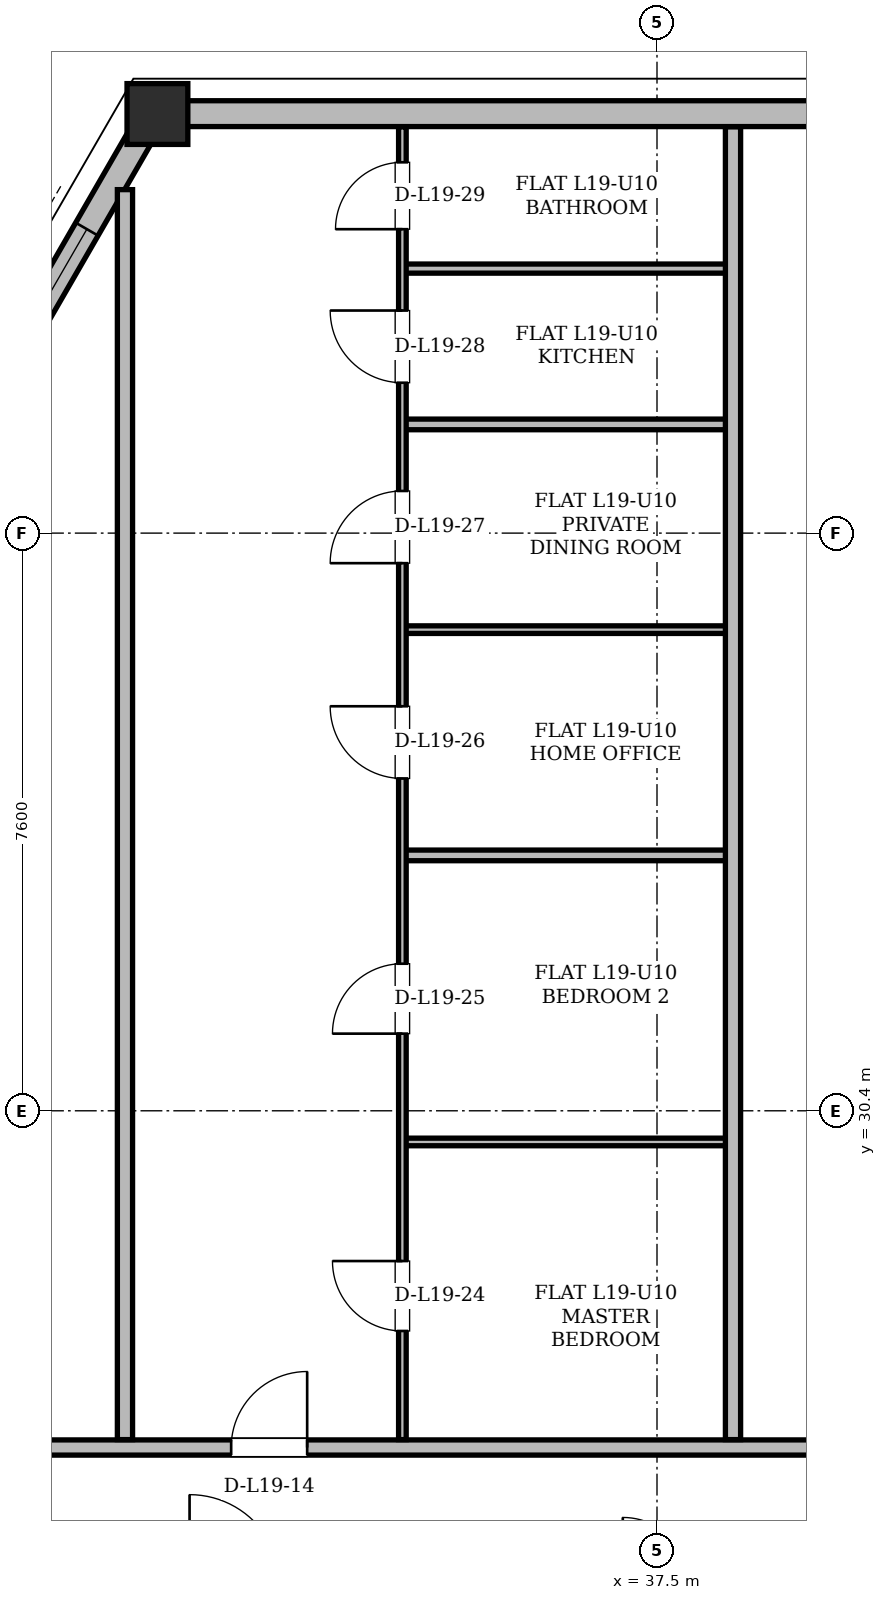
"""IFC4 building model, lengths in metres.
Left out: names, types, materials, properties, quantities, classifications, styles, units other than length and angle.
Written with IfcOpenShell. Run it as: python <this file> out.ifc"""

import sys

from ifc_helpers import new_model, si_unit, direction, frame, frame_2d, origin, origin_2d, place, context, subcontext, project, spatial, rectangle, hollow_rectangle, extrude, element, fill, save


model = new_model("IFC4")
c1 = context("Model", 3, precision=1e-05, world=origin(), true_north=direction((0.0, 1.0)))
c2 = subcontext(c1, "Body", "Model", "MODEL_VIEW")
j1 = project(units=[si_unit("LENGTHUNIT", "METRE"), si_unit("PLANEANGLEUNIT", "RADIAN")], contexts=[c1])
p1 = place(None, origin())
s1 = spatial("IfcSite", under=j1, at=p1, CompositionType="ELEMENT")
p2 = place(p1, origin())
s2 = spatial("IfcBuilding", under=s1, at=p2, CompositionType="ELEMENT")
p3 = place(p2, frame((0.0, 0.0, 74.1)))
s3 = spatial("IfcBuildingStorey", under=s2, at=p3, CompositionType="ELEMENT", Elevation=74.1)
p4 = place(p3, frame((30.876, 43.518, 0.004), z_axis=(0.028338509418, -0.002582406134, 0.999595048038), x_axis=(0.090751072182, 0.995873607893, 0.0)))
e1 = element("IfcColumn", 1, at=p4, inside=s3, PredefinedType="COLUMN", context=c2, shape_type="SweptSolid", body=[
    extrude(hollow_rectangle(XDim=0.8, YDim=0.8, WallThickness=0.065, at=origin_2d()), origin(), (0.0, 0.0, 1.0), 3.593),
])
p5 = place(p3, frame((44.124, 43.518, 0.0), z_axis=(0.0, 0.0, 1.0), x_axis=(-1.0, 0.0, 0.0)))
e2 = element("IfcWall", 2, at=p5, inside=s3, PredefinedType="SOLIDWALL", context=c2, shape_type="SweptSolid", body=[
    extrude(rectangle(XDim=13.248, YDim=0.34, at=frame_2d((6.624, 0.0))), origin(), (0.0, 0.0, 1.0), 2.474),
])
p6 = place(p5, frame((3.311, 0.0, 0.85)))
e3 = element("IfcOpeningElement", 3, at=p6, cuts=e2, PredefinedType="OPENING", context=c2, shape_type="SweptSolid", body=[
    extrude(rectangle(XDim=1.2, YDim=1.48, at=frame_2d((0.6, 0.74))), frame((0.0, 0.17, 0.0), z_axis=(0.0, -1.0, 0.0), x_axis=(1.0, 0.0, 0.0)), (0.0, 0.0, 1.0), 0.34),
])
p7 = place(p3, frame((30.876, 43.518, 0.0), z_axis=(0.0, 0.0, 1.0), x_axis=(-0.500000596145, -0.8660250596, 0.0)))
e4 = element("IfcWall", 4, at=p7, inside=s3, PredefinedType="SOLIDWALL", context=c2, shape_type="SweptSolid", body=[
    extrude(rectangle(XDim=33.938, YDim=0.34, at=frame_2d((16.969, 0.0))), origin(), (0.0, 0.0, 1.0), 2.474),
])
p8 = place(p7, frame((7.824, 0.0, 0.0)))
e5 = element("IfcOpeningElement", 5, at=p8, cuts=e4, PredefinedType="OPENING", context=c2, shape_type="SweptSolid", body=[
    extrude(rectangle(XDim=1.5, YDim=2.2, at=frame_2d((0.75, 1.1))), frame((0.0, 0.17, 0.0), z_axis=(0.0, -1.0, 0.0), x_axis=(1.0, 0.0, 0.0)), (0.0, 0.0, 1.0), 0.34),
])
p9 = place(p7, frame((25.439, 0.0, 0.0)))
e6 = element("IfcOpeningElement", 6, at=p9, cuts=e4, PredefinedType="OPENING", context=c2, shape_type="SweptSolid", body=[
    extrude(rectangle(XDim=1.5, YDim=2.2, at=frame_2d((0.75, 1.1))), frame((0.0, 0.17, 0.0), z_axis=(0.0, -1.0, 0.0), x_axis=(1.0, 0.0, 0.0)), (0.0, 0.0, 1.0), 0.34),
])
p10 = place(p7, frame((30.161, 0.0, 0.85)))
e7 = element("IfcOpeningElement", 7, at=p10, cuts=e4, PredefinedType="OPENING", context=c2, shape_type="SweptSolid", body=[
    extrude(rectangle(XDim=2.0, YDim=1.514, at=frame_2d((1.0, 0.757))), frame((0.0, 0.17, 0.0), z_axis=(0.0, -1.0, 0.0), x_axis=(1.0, 0.0, 0.0)), (0.0, 0.0, 1.0), 0.34),
])
p11 = place(p7, frame((1.755, 0.0, 0.85)))
e8 = element("IfcOpeningElement", 8, at=p11, cuts=e4, PredefinedType="OPENING", context=c2, shape_type="SweptSolid", body=[
    extrude(rectangle(XDim=1.2, YDim=1.474, at=frame_2d((0.6, 0.737))), frame((0.0, 0.17, 0.0), z_axis=(0.0, -1.0, 0.0), x_axis=(1.0, 0.0, 0.0)), (0.0, 0.0, 1.0), 0.34),
])
p12 = place(p7, frame((11.834, 0.0, 0.85)))
e9 = element("IfcOpeningElement", 9, at=p12, cuts=e4, PredefinedType="OPENING", context=c2, shape_type="SweptSolid", body=[
    extrude(rectangle(XDim=1.2, YDim=1.474, at=frame_2d((0.6, 0.737))), frame((0.0, 0.17, 0.0), z_axis=(0.0, -1.0, 0.0), x_axis=(1.0, 0.0, 0.0)), (0.0, 0.0, 1.0), 0.34),
])
p13 = place(p7, frame((14.358, 0.0, 0.85)))
e10 = element("IfcOpeningElement", 10, at=p13, cuts=e4, PredefinedType="OPENING", context=c2, shape_type="SweptSolid", body=[
    extrude(rectangle(XDim=1.2, YDim=1.474, at=frame_2d((0.6, 0.737))), frame((0.0, 0.17, 0.0), z_axis=(0.0, -1.0, 0.0), x_axis=(1.0, 0.0, 0.0)), (0.0, 0.0, 1.0), 0.34),
])
p14 = place(p7, frame((17.071, 0.0, 0.85)))
e11 = element("IfcOpeningElement", 11, at=p14, cuts=e4, PredefinedType="OPENING", context=c2, shape_type="SweptSolid", body=[
    extrude(rectangle(XDim=1.2, YDim=1.474, at=frame_2d((0.6, 0.737))), frame((0.0, 0.17, 0.0), z_axis=(0.0, -1.0, 0.0), x_axis=(1.0, 0.0, 0.0)), (0.0, 0.0, 1.0), 0.34),
])
p15 = place(p7, frame((32.628, 0.0, 0.85)))
e12 = element("IfcOpeningElement", 12, at=p15, cuts=e4, PredefinedType="OPENING", context=c2, shape_type="SweptSolid", body=[
    extrude(rectangle(XDim=0.7, YDim=1.2, at=frame_2d((0.35, 0.6))), frame((0.0, 0.17, 0.0), z_axis=(0.0, -1.0, 0.0), x_axis=(1.0, 0.0, 0.0)), (0.0, 0.0, 1.0), 0.34),
])
p16 = place(p3, frame((27.55, 25.97, 0.0), z_axis=(0.0, 0.0, 1.0), x_axis=(1.0, 0.0, 0.0)))
e13 = element("IfcWall", 13, at=p16, inside=s3, PredefinedType="PARTITIONING", context=c2, shape_type="SweptSolid", body=[
    extrude(rectangle(XDim=19.9, YDim=0.2, at=frame_2d((9.95, 0.0))), origin(), (0.0, 0.0, 1.0), 2.718),
])
p17 = place(p16, frame((0.425, 0.0, 0.0)))
e14 = element("IfcOpeningElement", 14, at=p17, cuts=e13, PredefinedType="OPENING", context=c2, shape_type="SweptSolid", body=[
    extrude(rectangle(XDim=1.0, YDim=2.18, at=frame_2d((0.5, 1.09))), frame((0.0, 0.1, 0.0), z_axis=(0.0, -1.0, 0.0), x_axis=(1.0, 0.0, 0.0)), (0.0, 0.0, 1.0), 0.2),
])
p18 = place(p16, frame((4.347, 0.0, 0.0)))
e15 = element("IfcOpeningElement", 15, at=p18, cuts=e13, PredefinedType="OPENING", context=c2, shape_type="SweptSolid", body=[
    extrude(rectangle(XDim=1.0, YDim=2.18, at=frame_2d((0.5, 1.09))), frame((0.0, 0.1, 0.0), z_axis=(0.0, -1.0, 0.0), x_axis=(1.0, 0.0, 0.0)), (0.0, 0.0, 1.0), 0.2),
])
p19 = place(p16, frame((12.208, 0.0, 0.0)))
e16 = element("IfcOpeningElement", 16, at=p19, cuts=e13, PredefinedType="OPENING", context=c2, shape_type="SweptSolid", body=[
    extrude(rectangle(XDim=1.0, YDim=2.18, at=frame_2d((0.5, 1.09))), frame((0.0, 0.1, 0.0), z_axis=(0.0, -1.0, 0.0), x_axis=(1.0, 0.0, 0.0)), (0.0, 0.0, 1.0), 0.2),
])
p20 = place(p3, frame((34.15, 29.99, 0.0), z_axis=(0.0, 0.0, 1.0), x_axis=(1.0, 0.0, 0.0)))
e17 = element("IfcWall", 17, at=p20, inside=s3, PredefinedType="PARTITIONING", context=c2, shape_type="SweptSolid", body=[
    extrude(rectangle(XDim=4.4, YDim=0.1, at=frame_2d((2.2, 0.0))), origin(), (0.0, 0.0, 1.0), 3.34),
])
p21 = place(p3, frame((34.15, 33.76, 0.0), z_axis=(0.0, 0.0, 1.0), x_axis=(1.0, 0.0, 0.0)))
e18 = element("IfcWall", 18, at=p21, inside=s3, PredefinedType="PARTITIONING", context=c2, shape_type="SweptSolid", body=[
    extrude(rectangle(XDim=4.4, YDim=0.14, at=frame_2d((2.2, 0.0))), origin(), (0.0, 0.0, 1.0), 3.34),
])
p22 = place(p3, frame((34.15, 36.73, 0.0), z_axis=(0.0, 0.0, 1.0), x_axis=(1.0, 0.0, 0.0)))
e19 = element("IfcWall", 19, at=p22, inside=s3, PredefinedType="PARTITIONING", context=c2, shape_type="SweptSolid", body=[
    extrude(rectangle(XDim=4.4, YDim=0.1, at=frame_2d((2.2, 0.0))), origin(), (0.0, 0.0, 1.0), 3.34),
])
p23 = place(p3, frame((34.15, 39.43, 0.0), z_axis=(0.0, 0.0, 1.0), x_axis=(1.0, 0.0, 0.0)))
e20 = element("IfcWall", 20, at=p23, inside=s3, PredefinedType="PARTITIONING", context=c2, shape_type="SweptSolid", body=[
    extrude(rectangle(XDim=4.4, YDim=0.14, at=frame_2d((2.2, 0.0))), origin(), (0.0, 0.0, 1.0), 3.34),
])
p24 = place(p3, frame((34.15, 41.48, 0.0), z_axis=(0.0, 0.0, 1.0), x_axis=(1.0, 0.0, 0.0)))
e21 = element("IfcWall", 21, at=p24, inside=s3, PredefinedType="PARTITIONING", context=c2, shape_type="SweptSolid", body=[
    extrude(rectangle(XDim=4.4, YDim=0.12, at=frame_2d((2.2, 0.0))), origin(), (0.0, 0.0, 1.0), 3.34),
])
p25 = place(p3, frame((30.5, 26.074, 0.0), z_axis=(0.0, 0.0, 1.0), x_axis=(0.0, 1.0, 0.0)))
e22 = element("IfcWall", 22, at=p25, inside=s3, PredefinedType="PARTITIONING", context=c2, shape_type="SweptSolid", body=[
    extrude(rectangle(XDim=16.445, YDim=0.2, at=frame_2d((8.222, 0.0))), origin(), (0.0, 0.0, 1.0), 2.474),
])
p26 = place(p3, frame((34.15, 26.074, 0.0), z_axis=(0.0, 0.0, 1.0), x_axis=(0.0, 1.0, 0.0)))
e23 = element("IfcWall", 23, at=p26, inside=s3, PredefinedType="PARTITIONING", context=c2, shape_type="SweptSolid", body=[
    extrude(rectangle(XDim=17.271, YDim=0.1, at=frame_2d((8.635, 0.0))), origin(), (0.0, 0.0, 1.0), 3.34),
])
p27 = place(p26, frame((1.429, 0.0, 0.0)))
e24 = element("IfcOpeningElement", 24, at=p27, cuts=e23, PredefinedType="OPENING", context=c2, shape_type="SweptSolid", body=[
    extrude(rectangle(XDim=0.92, YDim=2.12, at=frame_2d((0.46, 1.06))), frame((0.0, 0.05, 0.0), z_axis=(0.0, -1.0, 0.0), x_axis=(1.0, 0.0, 0.0)), (0.0, 0.0, 1.0), 0.1),
])
p28 = place(p26, frame((5.341, 0.0, 0.0)))
e25 = element("IfcOpeningElement", 25, at=p28, cuts=e23, PredefinedType="OPENING", context=c2, shape_type="SweptSolid", body=[
    extrude(rectangle(XDim=0.92, YDim=2.12, at=frame_2d((0.46, 1.06))), frame((0.0, 0.05, 0.0), z_axis=(0.0, -1.0, 0.0), x_axis=(1.0, 0.0, 0.0)), (0.0, 0.0, 1.0), 0.1),
])
p29 = place(p26, frame((8.698, 0.0, 0.0)))
e26 = element("IfcOpeningElement", 26, at=p29, cuts=e23, PredefinedType="OPENING", context=c2, shape_type="SweptSolid", body=[
    extrude(rectangle(XDim=0.95, YDim=2.1, at=frame_2d((0.475, 1.05))), frame((0.0, 0.05, 0.0), z_axis=(0.0, -1.0, 0.0), x_axis=(1.0, 0.0, 0.0)), (0.0, 0.0, 1.0), 0.1),
])
p30 = place(p26, frame((11.531, 0.0, 0.0)))
e27 = element("IfcOpeningElement", 27, at=p30, cuts=e23, PredefinedType="OPENING", context=c2, shape_type="SweptSolid", body=[
    extrude(rectangle(XDim=0.95, YDim=2.1, at=frame_2d((0.475, 1.05))), frame((0.0, 0.05, 0.0), z_axis=(0.0, -1.0, 0.0), x_axis=(1.0, 0.0, 0.0)), (0.0, 0.0, 1.0), 0.1),
])
p31 = place(p26, frame((13.904, 0.0, 0.0)))
e28 = element("IfcOpeningElement", 28, at=p31, cuts=e23, PredefinedType="OPENING", context=c2, shape_type="SweptSolid", body=[
    extrude(rectangle(XDim=0.95, YDim=2.1, at=frame_2d((0.475, 1.05))), frame((0.0, 0.05, 0.0), z_axis=(0.0, -1.0, 0.0), x_axis=(1.0, 0.0, 0.0)), (0.0, 0.0, 1.0), 0.1),
])
p32 = place(p26, frame((15.924, 0.0, 0.0)))
e29 = element("IfcOpeningElement", 29, at=p32, cuts=e23, PredefinedType="OPENING", context=c2, shape_type="SweptSolid", body=[
    extrude(rectangle(XDim=0.88, YDim=2.08, at=frame_2d((0.44, 1.04))), frame((0.0, 0.05, 0.0), z_axis=(0.0, -1.0, 0.0), x_axis=(1.0, 0.0, 0.0)), (0.0, 0.0, 1.0), 0.1),
])
p33 = place(p3, frame((38.5, 26.074, 0.0), z_axis=(0.0, 0.0, 1.0), x_axis=(0.0, 1.0, 0.0)))
e30 = element("IfcWall", 30, at=p33, inside=s3, PredefinedType="PARTITIONING", context=c2, shape_type="SweptSolid", body=[
    extrude(rectangle(XDim=17.271, YDim=0.2, at=frame_2d((8.635, 0.0))), origin(), (0.0, 0.0, 1.0), 3.34),
])
p34 = place(p11, origin())
e31 = element("IfcWindow", 31, at=p34, inside=s3, PartitioningType="SINGLE_PANEL", PredefinedType="WINDOW", context=c2, shape_type="SweptSolid", body=[
    extrude(rectangle(XDim=1.2, YDim=1.474, at=frame_2d((0.6, 0.737))), frame((0.0, 0.03, 0.0), z_axis=(0.0, -1.0, 0.0), x_axis=(1.0, 0.0, 0.0)), (0.0, 0.0, 1.0), 0.06),
])
fill(e8, e31)
p35 = place(p18, origin())
e32 = element("IfcDoor", 32, at=p35, inside=s3, OperationType="SINGLE_SWING_RIGHT", PredefinedType="DOOR", context=c2, shape_type="SweptSolid", body=[
    extrude(rectangle(XDim=1.0, YDim=2.18, at=frame_2d((0.5, 1.09))), frame((0.0, 0.025, 0.0), z_axis=(0.0, -1.0, 0.0), x_axis=(1.0, 0.0, 0.0)), (0.0, 0.0, 1.0), 0.05),
])
fill(e15, e32)
p36 = place(p27, origin())
e33 = element("IfcDoor", 33, at=p36, inside=s3, OperationType="SINGLE_SWING_RIGHT", PredefinedType="DOOR", context=c2, shape_type="SweptSolid", body=[
    extrude(rectangle(XDim=0.92, YDim=2.12, at=frame_2d((0.46, 1.06))), frame((0.0, 0.025, 0.0), z_axis=(0.0, -1.0, 0.0), x_axis=(1.0, 0.0, 0.0)), (0.0, 0.0, 1.0), 0.05),
])
fill(e24, e33)
p37 = place(p28, origin())
e34 = element("IfcDoor", 34, at=p37, inside=s3, OperationType="SINGLE_SWING_LEFT", PredefinedType="DOOR", context=c2, shape_type="SweptSolid", body=[
    extrude(rectangle(XDim=0.92, YDim=2.12, at=frame_2d((0.46, 1.06))), frame((0.0, 0.025, 0.0), z_axis=(0.0, -1.0, 0.0), x_axis=(1.0, 0.0, 0.0)), (0.0, 0.0, 1.0), 0.05),
])
fill(e25, e34)
p38 = place(p29, origin())
e35 = element("IfcDoor", 35, at=p38, inside=s3, OperationType="SINGLE_SWING_RIGHT", PredefinedType="DOOR", context=c2, shape_type="SweptSolid", body=[
    extrude(rectangle(XDim=0.95, YDim=2.1, at=frame_2d((0.475, 1.05))), frame((0.0, 0.025, 0.0), z_axis=(0.0, -1.0, 0.0), x_axis=(1.0, 0.0, 0.0)), (0.0, 0.0, 1.0), 0.05),
])
fill(e26, e35)
p39 = place(p30, origin())
e36 = element("IfcDoor", 36, at=p39, inside=s3, OperationType="SINGLE_SWING_LEFT", PredefinedType="DOOR", context=c2, shape_type="SweptSolid", body=[
    extrude(rectangle(XDim=0.95, YDim=2.1, at=frame_2d((0.475, 1.05))), frame((0.0, 0.025, 0.0), z_axis=(0.0, -1.0, 0.0), x_axis=(1.0, 0.0, 0.0)), (0.0, 0.0, 1.0), 0.05),
])
fill(e27, e36)
p40 = place(p31, origin())
e37 = element("IfcDoor", 37, at=p40, inside=s3, OperationType="SINGLE_SWING_RIGHT", PredefinedType="DOOR", context=c2, shape_type="SweptSolid", body=[
    extrude(rectangle(XDim=0.95, YDim=2.1, at=frame_2d((0.475, 1.05))), frame((0.0, 0.025, 0.0), z_axis=(0.0, -1.0, 0.0), x_axis=(1.0, 0.0, 0.0)), (0.0, 0.0, 1.0), 0.05),
])
fill(e28, e37)
p41 = place(p32, origin())
e38 = element("IfcDoor", 38, at=p41, inside=s3, OperationType="SINGLE_SWING_LEFT", PredefinedType="DOOR", context=c2, shape_type="SweptSolid", body=[
    extrude(rectangle(XDim=0.88, YDim=2.08, at=frame_2d((0.44, 1.04))), frame((0.0, 0.025, 0.0), z_axis=(0.0, -1.0, 0.0), x_axis=(1.0, 0.0, 0.0)), (0.0, 0.0, 1.0), 0.05),
])
fill(e29, e38)
save(model, sys.argv[1])
